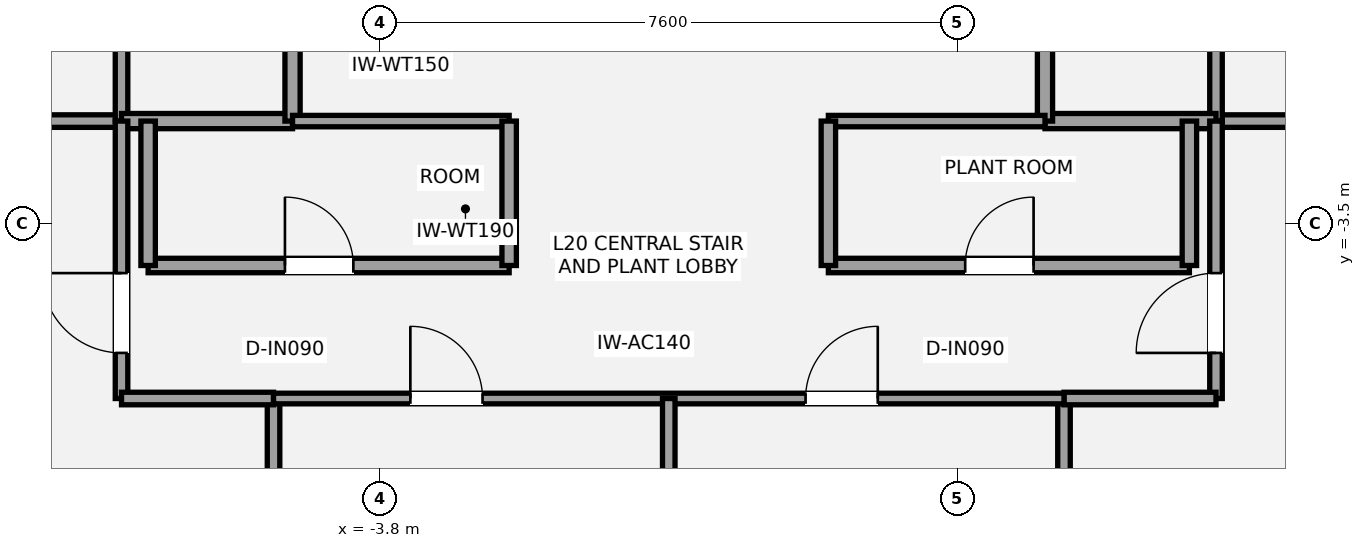
"""IFC4 building model, lengths in metres.
Left out: names, types, materials, properties, quantities, classifications, styles, units other than length and angle.
Written with IfcOpenShell. Run it as: python <this file> out.ifc"""

import sys

from ifc_helpers import new_model, si_unit, direction, frame, frame_2d, origin, place, context, subcontext, project, spatial, rectangle, extrude, element, fill, save


model = new_model("IFC4")
c1 = context("Model", 3, precision=1e-05, world=origin(), true_north=direction((0.0, 1.0)))
c2 = subcontext(c1, "Body", "Model", "MODEL_VIEW")
j1 = project(units=[si_unit("LENGTHUNIT", "METRE"), si_unit("PLANEANGLEUNIT", "RADIAN")], contexts=[c1])
p1 = place(None, origin())
s1 = spatial("IfcSite", under=j1, at=p1, CompositionType="ELEMENT")
p2 = place(p1, origin())
s2 = spatial("IfcBuilding", under=s1, at=p2, CompositionType="ELEMENT")
p3 = place(p2, frame((0.0, 0.0, 77.4)))
s3 = spatial("IfcBuildingStorey", under=s2, at=p3, CompositionType="ELEMENT", Elevation=77.4)
p4 = place(p3, frame((-13.45, -2.15, 0.0), z_axis=(0.0, 0.0, 1.0), x_axis=(1.0, 0.0, 0.0)))
e1 = element("IfcWall", 1, at=p4, inside=s3, PredefinedType="PARTITIONING", context=c2, shape_type="SweptSolid", body=[
    extrude(rectangle(XDim=6.25, YDim=0.165, at=frame_2d((3.125, 0.0))), origin(), (0.0, 0.0, 1.0), 3.733),
])
p5 = place(p4, frame((2.6, 0.0, 0.0)))
e2 = element("IfcOpeningElement", 2, at=p5, cuts=e1, PredefinedType="OPENING", context=c2, shape_type="SweptSolid", body=[
    extrude(rectangle(XDim=1.05, YDim=2.15, at=frame_2d((0.525, 1.075))), frame((0.0, 0.093, 0.0), z_axis=(0.0, -1.0, 0.0), x_axis=(1.0, 0.0, 0.0)), (0.0, 0.0, 1.0), 0.185),
])
p6 = place(p3, frame((-7.2, -2.15, 0.0), z_axis=(0.0, 0.0, 1.0), x_axis=(0.0, 1.0, 0.0)))
e3 = element("IfcWall", 3, at=p6, inside=s3, PredefinedType="PARTITIONING", context=c2, shape_type="SweptSolid", body=[
    extrude(rectangle(XDim=3.3, YDim=0.165, at=frame_2d((1.65, 0.0))), origin(), (0.0, 0.0, 1.0), 3.733),
])
p7 = place(p3, frame((-7.2, -2.15, 0.0), z_axis=(0.0, 0.0, 1.0), x_axis=(1.0, 0.0, 0.0)))
e4 = element("IfcWall", 4, at=p7, inside=s3, PredefinedType="SOLIDWALL", context=c2, shape_type="SweptSolid", body=[
    extrude(rectangle(XDim=2.25, YDim=0.2, at=frame_2d((1.125, 0.0))), origin(), (0.0, 0.0, 1.0), 2.47),
])
p8 = place(p3, frame((-4.95, -2.15, 0.0), z_axis=(0.0, 0.0, 1.0), x_axis=(0.0, 1.0, 0.0)))
e5 = element("IfcWall", 5, at=p8, inside=s3, PredefinedType="SOLIDWALL", context=c2, shape_type="SweptSolid", body=[
    extrude(rectangle(XDim=3.3, YDim=0.2, at=frame_2d((1.65, 0.0))), origin(), (0.0, 0.0, 1.0), 2.47),
])
p9 = place(p8, frame((0.95, 0.0, 0.0)))
e6 = element("IfcOpeningElement", 6, at=p9, cuts=e5, PredefinedType="OPENING", context=c2, shape_type="SweptSolid", body=[
    extrude(rectangle(XDim=0.75, YDim=2.1, at=frame_2d((0.375, 1.05))), frame((0.0, 0.11, 0.0), z_axis=(0.0, -1.0, 0.0), x_axis=(1.0, 0.0, 0.0)), (0.0, 0.0, 1.0), 0.22),
])
p10 = place(p3, frame((7.2, -2.15, 0.0), z_axis=(0.0, 0.0, 1.0), x_axis=(1.0, 0.0, 0.0)))
e7 = element("IfcWall", 7, at=p10, inside=s3, PredefinedType="PARTITIONING", context=c2, shape_type="SweptSolid", body=[
    extrude(rectangle(XDim=6.25, YDim=0.165, at=frame_2d((3.125, 0.0))), origin(), (0.0, 0.0, 1.0), 4.28),
])
p11 = place(p10, frame((1.4, 0.0, 0.0)))
e8 = element("IfcOpeningElement", 8, at=p11, cuts=e7, PredefinedType="OPENING", context=c2, shape_type="SweptSolid", body=[
    extrude(rectangle(XDim=1.05, YDim=2.15, at=frame_2d((0.525, 1.075))), frame((0.0, 0.093, 0.0), z_axis=(0.0, -1.0, 0.0), x_axis=(1.0, 0.0, 0.0)), (0.0, 0.0, 1.0), 0.185),
])
p12 = place(p3, frame((7.2, -2.15, 0.0), z_axis=(0.0, 0.0, 1.0), x_axis=(0.0, 1.0, 0.0)))
e9 = element("IfcWall", 9, at=p12, inside=s3, PredefinedType="PARTITIONING", context=c2, shape_type="SweptSolid", body=[
    extrude(rectangle(XDim=3.3, YDim=0.165, at=frame_2d((1.65, 0.0))), origin(), (0.0, 0.0, 1.0), 3.733),
])
p13 = place(p3, frame((4.95, -2.15, 0.0), z_axis=(0.0, 0.0, 1.0), x_axis=(1.0, 0.0, 0.0)))
e10 = element("IfcWall", 10, at=p13, inside=s3, PredefinedType="SOLIDWALL", context=c2, shape_type="SweptSolid", body=[
    extrude(rectangle(XDim=2.25, YDim=0.2, at=frame_2d((1.125, 0.0))), origin(), (0.0, 0.0, 1.0), 2.47),
])
p14 = place(p3, frame((4.95, -2.15, 0.0), z_axis=(0.0, 0.0, 1.0), x_axis=(0.0, 1.0, 0.0)))
e11 = element("IfcWall", 11, at=p14, inside=s3, PredefinedType="SOLIDWALL", context=c2, shape_type="SweptSolid", body=[
    extrude(rectangle(XDim=3.3, YDim=0.2, at=frame_2d((1.65, 0.0))), origin(), (0.0, 0.0, 1.0), 2.47),
])
p15 = place(p14, frame((0.95, 0.0, 0.0)))
e12 = element("IfcOpeningElement", 12, at=p15, cuts=e11, PredefinedType="OPENING", context=c2, shape_type="SweptSolid", body=[
    extrude(rectangle(XDim=0.75, YDim=2.1, at=frame_2d((0.375, 1.05))), frame((0.0, 0.11, 0.0), z_axis=(0.0, -1.0, 0.0), x_axis=(1.0, 0.0, 0.0)), (0.0, 0.0, 1.0), 0.22),
])
p16 = place(p3, frame((-6.85, -4.05, 0.0), z_axis=(0.0, 0.0, 1.0), x_axis=(1.0, 0.0, 0.0)))
e13 = element("IfcWall", 13, at=p16, inside=s3, PredefinedType="PLUMBINGWALL", context=c2, shape_type="SweptSolid", body=[
    extrude(rectangle(XDim=4.75, YDim=0.19, at=frame_2d((2.375, 0.0))), origin(), (0.0, 0.0, 1.0), 2.47),
])
p17 = place(p16, frame((1.8, 0.0, 0.0)))
e14 = element("IfcOpeningElement", 14, at=p17, cuts=e13, PredefinedType="OPENING", context=c2, shape_type="SweptSolid", body=[
    extrude(rectangle(XDim=0.9, YDim=2.1, at=frame_2d((0.45, 1.05))), frame((0.0, 0.105, 0.0), z_axis=(0.0, -1.0, 0.0), x_axis=(1.0, 0.0, 0.0)), (0.0, 0.0, 1.0), 0.21),
])
p18 = place(p3, frame((-4.95, -2.15, 0.0), z_axis=(0.0, 0.0, 1.0), x_axis=(1.0, 0.0, 0.0)))
e15 = element("IfcWall", 15, at=p18, inside=s3, PredefinedType="PLUMBINGWALL", context=c2, shape_type="SweptSolid", body=[
    extrude(rectangle(XDim=2.85, YDim=0.15, at=frame_2d((1.425, 0.0))), origin(), (0.0, 0.0, 1.0), 4.28),
])
for number, where, z_axis, x_axis in (
    (16, (-6.85, -4.05, 0.0), (0.0, 0.0, 1.0), (0.0, 1.0, 0.0)),
    (17, (-2.1, -4.05, 0.0), (0.0, 0.0, 1.0), (0.0, 1.0, 0.0)),
):
    element("IfcWall", number, at=place(p3, frame(where, z_axis=z_axis, x_axis=x_axis)), inside=s3, PredefinedType="PLUMBINGWALL", context=c2, shape_type="SweptSolid", body=[
        extrude(rectangle(XDim=1.9, YDim=0.19, at=frame_2d((0.95, 0.0))), origin(), (0.0, 0.0, 1.0), 4.28),
    ])
p19 = place(p3, frame((2.1, -4.05, 0.0), z_axis=(0.0, 0.0, 1.0), x_axis=(1.0, 0.0, 0.0)))
e18 = element("IfcWall", 18, at=p19, inside=s3, PredefinedType="PLUMBINGWALL", context=c2, shape_type="SweptSolid", body=[
    extrude(rectangle(XDim=4.75, YDim=0.19, at=frame_2d((2.375, 0.0))), origin(), (0.0, 0.0, 1.0), 2.47),
])
p20 = place(p19, frame((1.8, 0.0, 0.0)))
e19 = element("IfcOpeningElement", 19, at=p20, cuts=e18, PredefinedType="OPENING", context=c2, shape_type="SweptSolid", body=[
    extrude(rectangle(XDim=0.9, YDim=2.1, at=frame_2d((0.45, 1.05))), frame((0.0, 0.105, 0.0), z_axis=(0.0, -1.0, 0.0), x_axis=(1.0, 0.0, 0.0)), (0.0, 0.0, 1.0), 0.21),
])
p21 = place(p3, frame((2.1, -2.15, 0.0), z_axis=(0.0, 0.0, 1.0), x_axis=(1.0, 0.0, 0.0)))
e20 = element("IfcWall", 20, at=p21, inside=s3, PredefinedType="PLUMBINGWALL", context=c2, shape_type="SweptSolid", body=[
    extrude(rectangle(XDim=2.85, YDim=0.15, at=frame_2d((1.425, 0.0))), origin(), (0.0, 0.0, 1.0), 4.28),
])
for number, where, z_axis, x_axis in (
    (21, (2.1, -4.05, 0.0), (0.0, 0.0, 1.0), (0.0, 1.0, 0.0)),
    (22, (6.85, -4.05, 0.0), (0.0, 0.0, 1.0), (0.0, 1.0, 0.0)),
):
    element("IfcWall", number, at=place(p3, frame(where, z_axis=z_axis, x_axis=x_axis)), inside=s3, PredefinedType="PLUMBINGWALL", context=c2, shape_type="SweptSolid", body=[
        extrude(rectangle(XDim=1.9, YDim=0.19, at=frame_2d((0.95, 0.0))), origin(), (0.0, 0.0, 1.0), 4.28),
    ])
p22 = place(p3, frame((-7.2, -5.8, 0.0), z_axis=(0.0, 0.0, 1.0), x_axis=(0.0, 1.0, 0.0)))
e23 = element("IfcWall", 23, at=p22, inside=s3, PredefinedType="PARTITIONING", context=c2, shape_type="SweptSolid", body=[
    extrude(rectangle(XDim=3.65, YDim=0.165, at=frame_2d((1.825, 0.0))), origin(), (0.0, 0.0, 1.0), 4.28),
])
p23 = place(p22, frame((0.6, 0.0, 0.0)))
e24 = element("IfcOpeningElement", 24, at=p23, cuts=e23, PredefinedType="OPENING", context=c2, shape_type="SweptSolid", body=[
    extrude(rectangle(XDim=1.05, YDim=2.15, at=frame_2d((0.525, 1.075))), frame((0.0, 0.093, 0.0), z_axis=(0.0, -1.0, 0.0), x_axis=(1.0, 0.0, 0.0)), (0.0, 0.0, 1.0), 0.185),
])
p24 = place(p3, frame((7.2, -5.8, 0.0), z_axis=(0.0, 0.0, 1.0), x_axis=(0.0, 1.0, 0.0)))
e25 = element("IfcWall", 25, at=p24, inside=s3, PredefinedType="PARTITIONING", context=c2, shape_type="SweptSolid", body=[
    extrude(rectangle(XDim=3.65, YDim=0.165, at=frame_2d((1.825, 0.0))), origin(), (0.0, 0.0, 1.0), 3.733),
])
p25 = place(p24, frame((0.6, 0.0, 0.0)))
e26 = element("IfcOpeningElement", 26, at=p25, cuts=e25, PredefinedType="OPENING", context=c2, shape_type="SweptSolid", body=[
    extrude(rectangle(XDim=1.05, YDim=2.15, at=frame_2d((0.525, 1.075))), frame((0.0, 0.093, 0.0), z_axis=(0.0, -1.0, 0.0), x_axis=(1.0, 0.0, 0.0)), (0.0, 0.0, 1.0), 0.185),
])
p26 = place(p3, frame((-5.2, -18.634, 0.0), z_axis=(0.0, 0.0, 1.0), x_axis=(0.0, 1.0, 0.0)))
e27 = element("IfcWall", 27, at=p26, inside=s3, PredefinedType="PARTITIONING", context=c2, shape_type="SweptSolid", body=[
    extrude(rectangle(XDim=12.834, YDim=0.165, at=frame_2d((6.417, 0.0))), origin(), (0.0, 0.0, 1.0), 4.28),
])
p27 = place(p3, frame((5.2, -18.634, 0.0), z_axis=(0.0, 0.0, 1.0), x_axis=(0.0, 1.0, 0.0)))
e28 = element("IfcWall", 28, at=p27, inside=s3, PredefinedType="PARTITIONING", context=c2, shape_type="SweptSolid", body=[
    extrude(rectangle(XDim=12.834, YDim=0.165, at=frame_2d((6.417, 0.0))), origin(), (0.0, 0.0, 1.0), 3.733),
])
for number, where, z_axis, x_axis in (
    (29, (-7.2, -5.8, 0.0), (0.0, 0.0, 1.0), (1.0, 0.0, 0.0)),
    (30, (5.2, -5.8, 0.0), (0.0, 0.0, 1.0), (1.0, 0.0, 0.0)),
):
    element("IfcWall", number, at=place(p3, frame(where, z_axis=z_axis, x_axis=x_axis)), inside=s3, PredefinedType="PARTITIONING", context=c2, shape_type="SweptSolid", body=[
        extrude(rectangle(XDim=2.0, YDim=0.165, at=frame_2d((1.0, 0.0))), origin(), (0.0, 0.0, 1.0), 2.47),
    ])
p28 = place(p3, frame((-5.2, -5.8, 0.0), z_axis=(0.0, 0.0, 1.0), x_axis=(1.0, 0.0, 0.0)))
e31 = element("IfcWall", 31, at=p28, inside=s3, PredefinedType="PARTITIONING", context=c2, shape_type="SweptSolid", body=[
    extrude(rectangle(XDim=10.4, YDim=0.14, at=frame_2d((5.2, 0.0))), origin(), (0.0, 0.0, 1.0), 4.28),
])
p29 = place(p28, frame((1.8, 0.0, 0.0)))
e32 = element("IfcOpeningElement", 32, at=p29, cuts=e31, PredefinedType="OPENING", context=c2, shape_type="SweptSolid", body=[
    extrude(rectangle(XDim=0.95, YDim=2.15, at=frame_2d((0.475, 1.075))), frame((0.0, 0.08, 0.0), z_axis=(0.0, -1.0, 0.0), x_axis=(1.0, 0.0, 0.0)), (0.0, 0.0, 1.0), 0.16),
])
p30 = place(p28, frame((7.0, 0.0, 0.0)))
e33 = element("IfcOpeningElement", 33, at=p30, cuts=e31, PredefinedType="OPENING", context=c2, shape_type="SweptSolid", body=[
    extrude(rectangle(XDim=0.95, YDim=2.15, at=frame_2d((0.475, 1.075))), frame((0.0, 0.08, 0.0), z_axis=(0.0, -1.0, 0.0), x_axis=(1.0, 0.0, 0.0)), (0.0, 0.0, 1.0), 0.16),
])
p31 = place(p3, frame((0.0, -18.958, 0.0), z_axis=(0.0, 0.0, 1.0), x_axis=(0.0, 1.0, 0.0)))
e34 = element("IfcWall", 34, at=p31, inside=s3, PredefinedType="PARTITIONING", context=c2, shape_type="SweptSolid", body=[
    extrude(rectangle(XDim=13.158, YDim=0.165, at=frame_2d((6.579, 0.0))), origin(), (0.0, 0.0, 1.0), 4.28),
])
p32 = place(p17, origin())
e35 = element("IfcDoor", 35, at=p32, inside=s3, OperationType="SINGLE_SWING_LEFT", PredefinedType="DOOR", context=c2, shape_type="SweptSolid", body=[
    extrude(rectangle(XDim=0.9, YDim=2.1, at=frame_2d((0.45, 1.05))), frame((0.0, 0.025, 0.0), z_axis=(0.0, -1.0, 0.0), x_axis=(1.0, 0.0, 0.0)), (0.0, 0.0, 1.0), 0.05),
])
fill(e14, e35)
p33 = place(p20, origin())
e36 = element("IfcDoor", 36, at=p33, inside=s3, OperationType="SINGLE_SWING_RIGHT", PredefinedType="DOOR", context=c2, shape_type="SweptSolid", body=[
    extrude(rectangle(XDim=0.9, YDim=2.1, at=frame_2d((0.45, 1.05))), frame((0.0, 0.025, 0.0), z_axis=(0.0, -1.0, 0.0), x_axis=(1.0, 0.0, 0.0)), (0.0, 0.0, 1.0), 0.05),
])
fill(e19, e36)
p34 = place(p23, origin())
e37 = element("IfcDoor", 37, at=p34, inside=s3, OperationType="SINGLE_SWING_RIGHT", PredefinedType="DOOR", context=c2, shape_type="SweptSolid", body=[
    extrude(rectangle(XDim=1.05, YDim=2.15, at=frame_2d((0.525, 1.075))), frame((0.0, 0.025, 0.0), z_axis=(0.0, -1.0, 0.0), x_axis=(1.0, 0.0, 0.0)), (0.0, 0.0, 1.0), 0.05),
])
fill(e24, e37)
p35 = place(p25, origin())
e38 = element("IfcDoor", 38, at=p35, inside=s3, OperationType="SINGLE_SWING_LEFT", PredefinedType="DOOR", context=c2, shape_type="SweptSolid", body=[
    extrude(rectangle(XDim=1.05, YDim=2.15, at=frame_2d((0.525, 1.075))), frame((0.0, 0.025, 0.0), z_axis=(0.0, -1.0, 0.0), x_axis=(1.0, 0.0, 0.0)), (0.0, 0.0, 1.0), 0.05),
])
fill(e26, e38)
p36 = place(p29, origin())
e39 = element("IfcDoor", 39, at=p36, inside=s3, OperationType="SINGLE_SWING_LEFT", PredefinedType="DOOR", context=c2, shape_type="SweptSolid", body=[
    extrude(rectangle(XDim=0.95, YDim=2.15, at=frame_2d((0.475, 1.075))), frame((0.0, 0.025, 0.0), z_axis=(0.0, -1.0, 0.0), x_axis=(1.0, 0.0, 0.0)), (0.0, 0.0, 1.0), 0.05),
])
fill(e32, e39)
p37 = place(p30, origin())
e40 = element("IfcDoor", 40, at=p37, inside=s3, OperationType="SINGLE_SWING_RIGHT", PredefinedType="DOOR", context=c2, shape_type="SweptSolid", body=[
    extrude(rectangle(XDim=0.95, YDim=2.15, at=frame_2d((0.475, 1.075))), frame((0.0, 0.025, 0.0), z_axis=(0.0, -1.0, 0.0), x_axis=(1.0, 0.0, 0.0)), (0.0, 0.0, 1.0), 0.05),
])
fill(e33, e40)
save(model, sys.argv[1])
